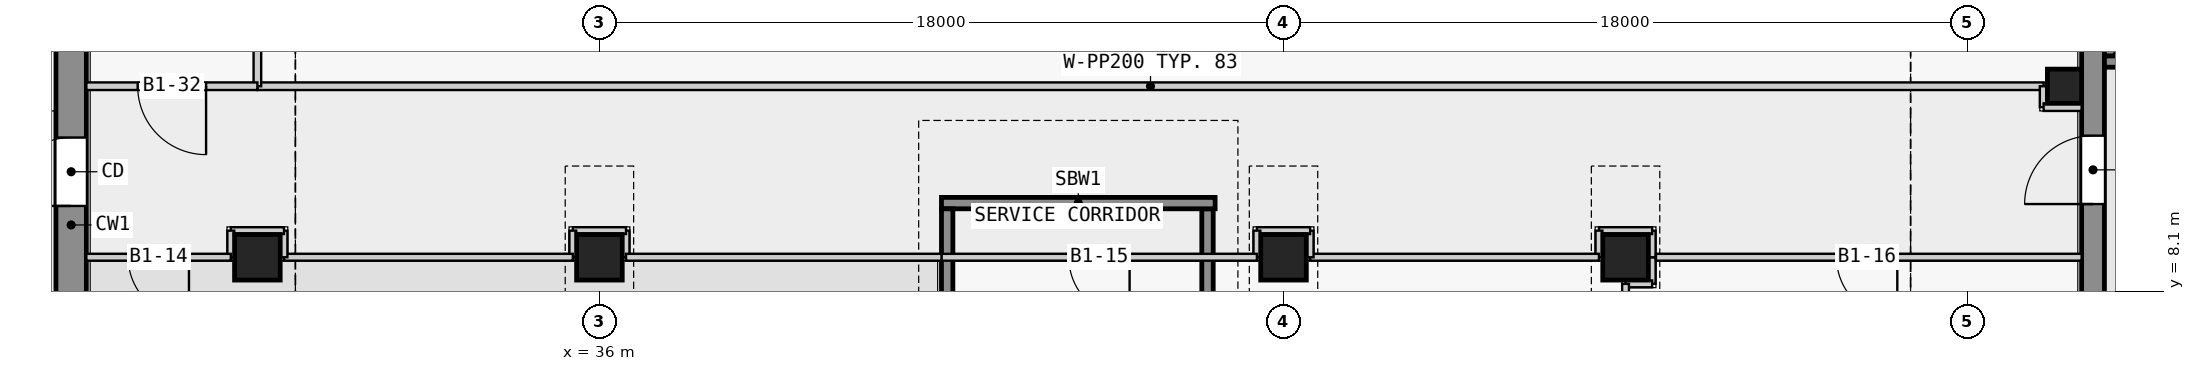
"""IFC4 building model, lengths in metres.
Left out: names, types, materials, properties, quantities, classifications, styles, units other than length and angle.
Written with IfcOpenShell. Run it as: python <this file> out.ifc"""

import sys

from ifc_helpers import new_model, si_unit, direction, frame, frame_2d, origin, origin_2d, place, context, subcontext, project, spatial, rectangle, extrude, element, fill, save


model = new_model("IFC4")
c1 = context("Model", 3, precision=1e-05, world=origin(), true_north=direction((0.0, 1.0)))
c2 = subcontext(c1, "Body", "Model", "MODEL_VIEW")
j1 = project(units=[si_unit("LENGTHUNIT", "METRE"), si_unit("PLANEANGLEUNIT", "RADIAN")], contexts=[c1])
p1 = place(None, origin())
s1 = spatial("IfcSite", under=j1, at=p1, CompositionType="ELEMENT")
p2 = place(p1, origin())
s2 = spatial("IfcBuilding", under=s1, at=p2, CompositionType="ELEMENT")
p3 = place(p2, frame((0.0, 0.0, -7.0)))
s3 = spatial("IfcBuildingStorey", under=s2, at=p3, CompositionType="ELEMENT", Elevation=-7.0)
for number, where, z_axis, x_axis in (
    (1, (27.0, 9.0, 0.0), (0.0, 0.0, 1.0), (1.0, 0.0, 0.0)),
    (2, (36.0, 9.0, 0.0), (0.0, 0.0, 1.0), (1.0, 0.0, 0.0)),
    (3, (54.0, 9.0, 0.0), (0.0, 0.0, 1.0), (1.0, 0.0, 0.0)),
    (4, (63.0, 9.0, 0.0), (0.0, 0.0, 1.0), (1.0, 0.0, 0.0)),
):
    element("IfcColumn", number, at=place(p3, frame(where, z_axis=z_axis, x_axis=x_axis)), inside=s3, PredefinedType="COLUMN", context=c2, shape_type="SweptSolid", body=[
        extrude(rectangle(XDim=1.2, YDim=1.2, at=origin_2d()), origin(), (0.0, 0.0, 1.0), 7.0),
    ])
p4 = place(p3, frame((74.55, 13.5, 0.0), z_axis=(0.0, 0.0, 1.0), x_axis=(1.0, 0.0, 0.0)))
e5 = element("IfcColumn", 5, at=p4, inside=s3, PredefinedType="COLUMN", context=c2, shape_type="SweptSolid", body=[
    extrude(rectangle(XDim=0.9, YDim=0.9, at=origin_2d()), origin(), (0.0, 0.0, 1.0), 7.0),
])
p5 = place(p3, frame((22.1, 2.5, 0.0), z_axis=(0.0, 0.0, 1.0), x_axis=(0.0, 1.0, 0.0)))
e6 = element("IfcWall", 6, at=p5, inside=s3, PredefinedType="SHEAR", context=c2, shape_type="SweptSolid", body=[
    extrude(rectangle(XDim=14.7, YDim=0.8, at=frame_2d((7.35, 0.0))), origin(), (0.0, 0.0, 1.0), 6.55),
])
p6 = place(p5, frame((7.85, 0.0, 0.0)))
e7 = element("IfcOpeningElement", 7, at=p6, cuts=e6, PredefinedType="OPENING", context=c2, shape_type="SweptSolid", body=[
    extrude(rectangle(XDim=1.8, YDim=2.1, at=frame_2d((0.9, 1.05))), frame((0.0, 0.41, 0.0), z_axis=(0.0, -1.0, 0.0), x_axis=(1.0, 0.0, 0.0)), (0.0, 0.0, 1.0), 0.82),
])
p7 = place(p3, frame((75.3, 0.6, 0.0), z_axis=(0.0, 0.0, 1.0), x_axis=(0.0, 1.0, 0.0)))
e8 = element("IfcWall", 8, at=p7, inside=s3, PredefinedType="SHEAR", context=c2, shape_type="SweptSolid", body=[
    extrude(rectangle(XDim=16.8, YDim=0.6, at=frame_2d((8.4, 0.0))), origin(), (0.0, 0.0, 1.0), 6.55),
])
p8 = place(p7, frame((9.8, 0.0, 0.0)))
e9 = element("IfcOpeningElement", 9, at=p8, cuts=e8, PredefinedType="OPENING", context=c2, shape_type="SweptSolid", body=[
    extrude(rectangle(XDim=1.8, YDim=2.1, at=frame_2d((0.9, 1.05))), frame((0.0, 0.31, 0.0), z_axis=(0.0, -1.0, 0.0), x_axis=(1.0, 0.0, 0.0)), (0.0, 0.0, 1.0), 0.62),
])
p9 = place(p3, frame((75.6, 14.15, 0.0), z_axis=(0.0, 0.0, 1.0), x_axis=(1.0, 0.0, 0.0)))
e10 = element("IfcWall", 10, at=p9, inside=s3, PredefinedType="SHEAR", context=c2, shape_type="SweptSolid", body=[
    extrude(rectangle(XDim=9.9, YDim=0.3, at=frame_2d((4.95, 0.0))), origin(), (0.0, 0.0, 1.0), 6.55),
])
p10 = place(p9, frame((5.75, 0.0, 0.0)))
e11 = element("IfcOpeningElement", 11, at=p10, cuts=e10, PredefinedType="OPENING", context=c2, shape_type="SweptSolid", body=[
    extrude(rectangle(XDim=1.1, YDim=2.1, at=frame_2d((0.55, 1.05))), frame((0.0, 0.16, 0.0), z_axis=(0.0, -1.0, 0.0), x_axis=(1.0, 0.0, 0.0)), (0.0, 0.0, 1.0), 0.32),
])
p11 = place(p9, frame((8.05, 0.0, 0.0)))
e12 = element("IfcOpeningElement", 12, at=p11, cuts=e10, PredefinedType="OPENING", context=c2, shape_type="SweptSolid", body=[
    extrude(rectangle(XDim=1.1, YDim=2.1, at=frame_2d((0.55, 1.05))), frame((0.0, 0.16, 0.0), z_axis=(0.0, -1.0, 0.0), x_axis=(1.0, 0.0, 0.0)), (0.0, 0.0, 1.0), 0.32),
])
p12 = place(p3, frame((75.75, 14.3, 0.0), z_axis=(0.0, 0.0, 1.0), x_axis=(0.0, 1.0, 0.0)))
e13 = element("IfcWall", 13, at=p12, inside=s3, PredefinedType="SHEAR", context=c2, shape_type="SweptSolid", body=[
    extrude(rectangle(XDim=2.8, YDim=0.3, at=frame_2d((1.4, 0.0))), origin(), (0.0, 0.0, 1.0), 6.55),
])
for number, where, z_axis, x_axis in (
    (14, (45.15, 7.725, 0.0), (0.0, 0.0, 1.0), (0.0, 1.0, 0.0)),
    (15, (52.0, 7.725, 0.0), (0.0, 0.0, 1.0), (0.0, 1.0, 0.0)),
):
    element("IfcWall", number, at=place(p3, frame(where, z_axis=z_axis, x_axis=x_axis)), inside=s3, PredefinedType="SHEAR", context=c2, shape_type="SweptSolid", body=[
        extrude(rectangle(XDim=2.55, YDim=0.3, at=frame_2d((1.275, 0.0))), origin(), (0.0, 0.0, 1.0), 6.55),
    ])
p13 = place(p3, frame((45.0, 10.425, 0.0), z_axis=(0.0, 0.0, 1.0), x_axis=(1.0, 0.0, 0.0)))
e16 = element("IfcWall", 16, at=p13, inside=s3, PredefinedType="SHEAR", context=c2, shape_type="SweptSolid", body=[
    extrude(rectangle(XDim=7.2, YDim=0.3, at=frame_2d((3.6, 0.0))), origin(), (0.0, 0.0, 1.0), 6.55),
])
p14 = place(p3, frame((27.0, 13.5, 0.0), z_axis=(0.0, 0.0, 1.0), x_axis=(1.0, 0.0, 0.0)))
e17 = element("IfcWall", 17, at=p14, inside=s3, PredefinedType="PARTITIONING", context=c2, shape_type="SweptSolid", body=[
    extrude(rectangle(XDim=47.0, YDim=0.2, at=frame_2d((23.5, 0.0))), origin(), (0.0, 0.0, 1.0), 6.55),
])
p15 = place(p3, frame((74.0, 13.5, 0.0), z_axis=(0.0, 0.0, 1.0), x_axis=(0.0, -1.0, 0.0)))
e18 = element("IfcWall", 18, at=p15, inside=s3, PredefinedType="PARTITIONING", context=c2, shape_type="SweptSolid", body=[
    extrude(rectangle(XDim=0.55, YDim=0.2, at=frame_2d((0.275, 0.0))), origin(), (0.0, 0.0, 1.0), 6.55),
])
p16 = place(p3, frame((74.0, 12.95, 0.0), z_axis=(0.0, 0.0, 1.0), x_axis=(1.0, 0.0, 0.0)))
e19 = element("IfcWall", 19, at=p16, inside=s3, PredefinedType="PARTITIONING", context=c2, shape_type="SweptSolid", body=[
    extrude(rectangle(XDim=1.0, YDim=0.2, at=frame_2d((0.5, 0.0))), origin(), (0.0, 0.0, 1.0), 6.55),
])
for number, where, z_axis, x_axis in (
    (20, (63.7, 9.0, 0.0), (0.0, 0.0, 1.0), (0.0, -1.0, 0.0)),
    (21, (63.7, 8.3, 0.0), (0.0, 0.0, 1.0), (-1.0, 0.0, 0.0)),
):
    element("IfcWall", number, at=place(p3, frame(where, z_axis=z_axis, x_axis=x_axis)), inside=s3, PredefinedType="PARTITIONING", context=c2, shape_type="SweptSolid", body=[
        extrude(rectangle(XDim=0.7, YDim=0.18, at=frame_2d((0.35, 0.0))), origin(), (0.0, 0.0, 1.0), 6.55),
    ])
p17 = place(p3, frame((63.0, 8.3, 0.0), z_axis=(0.0, 0.0, 1.0), x_axis=(0.0, -1.0, 0.0)))
e22 = element("IfcWall", 22, at=p17, inside=s3, PredefinedType="PARTITIONING", context=c2, shape_type="SweptSolid", body=[
    extrude(rectangle(XDim=7.6, YDim=0.18, at=frame_2d((3.8, 0.0))), origin(), (0.0, 0.0, 1.0), 6.55),
])
p18 = place(p3, frame((63.7, 9.0, 0.0), z_axis=(0.0, 0.0, 1.0), x_axis=(0.0, 1.0, 0.0)))
e23 = element("IfcWall", 23, at=p18, inside=s3, PredefinedType="PARTITIONING", context=c2, shape_type="SweptSolid", body=[
    extrude(rectangle(XDim=0.7, YDim=0.18, at=frame_2d((0.35, 0.0))), origin(), (0.0, 0.0, 1.0), 6.55),
])
p19 = place(p3, frame((63.7, 9.7, 0.0), z_axis=(0.0, 0.0, 1.0), x_axis=(-1.0, 0.0, 0.0)))
e24 = element("IfcWall", 24, at=p19, inside=s3, PredefinedType="PARTITIONING", context=c2, shape_type="SweptSolid", body=[
    extrude(rectangle(XDim=1.4, YDim=0.18, at=frame_2d((0.7, 0.0))), origin(), (0.0, 0.0, 1.0), 6.55),
])
p20 = place(p3, frame((62.3, 9.7, 0.0), z_axis=(0.0, 0.0, 1.0), x_axis=(0.0, -1.0, 0.0)))
e25 = element("IfcWall", 25, at=p20, inside=s3, PredefinedType="PARTITIONING", context=c2, shape_type="SweptSolid", body=[
    extrude(rectangle(XDim=0.7, YDim=0.18, at=frame_2d((0.35, 0.0))), origin(), (0.0, 0.0, 1.0), 6.55),
])
p21 = place(p3, frame((62.3, 9.0, 0.0), z_axis=(0.0, 0.0, 1.0), x_axis=(-1.0, 0.0, 0.0)))
e26 = element("IfcWall", 26, at=p21, inside=s3, PredefinedType="PARTITIONING", context=c2, shape_type="SweptSolid", body=[
    extrude(rectangle(XDim=7.6, YDim=0.18, at=frame_2d((3.8, 0.0))), origin(), (0.0, 0.0, 1.0), 6.55),
])
p22 = place(p3, frame((54.7, 9.0, 0.0), z_axis=(0.0, 0.0, 1.0), x_axis=(0.0, 1.0, 0.0)))
e27 = element("IfcWall", 27, at=p22, inside=s3, PredefinedType="PARTITIONING", context=c2, shape_type="SweptSolid", body=[
    extrude(rectangle(XDim=0.7, YDim=0.18, at=frame_2d((0.35, 0.0))), origin(), (0.0, 0.0, 1.0), 6.55),
])
p23 = place(p3, frame((54.7, 9.7, 0.0), z_axis=(0.0, 0.0, 1.0), x_axis=(-1.0, 0.0, 0.0)))
e28 = element("IfcWall", 28, at=p23, inside=s3, PredefinedType="PARTITIONING", context=c2, shape_type="SweptSolid", body=[
    extrude(rectangle(XDim=1.4, YDim=0.18, at=frame_2d((0.7, 0.0))), origin(), (0.0, 0.0, 1.0), 6.55),
])
p24 = place(p3, frame((53.3, 9.7, 0.0), z_axis=(0.0, 0.0, 1.0), x_axis=(0.0, -1.0, 0.0)))
e29 = element("IfcWall", 29, at=p24, inside=s3, PredefinedType="PARTITIONING", context=c2, shape_type="SweptSolid", body=[
    extrude(rectangle(XDim=0.7, YDim=0.18, at=frame_2d((0.35, 0.0))), origin(), (0.0, 0.0, 1.0), 6.55),
])
p25 = place(p3, frame((53.3, 9.0, 0.0), z_axis=(0.0, 0.0, 1.0), x_axis=(-1.0, 0.0, 0.0)))
e30 = element("IfcWall", 30, at=p25, inside=s3, PredefinedType="PARTITIONING", context=c2, shape_type="SweptSolid", body=[
    extrude(rectangle(XDim=8.3, YDim=0.18, at=frame_2d((4.15, 0.0))), origin(), (0.0, 0.0, 1.0), 6.55),
])
p26 = place(p25, frame((3.35, 0.0, 0.0)))
e31 = element("IfcOpeningElement", 31, at=p26, cuts=e30, PredefinedType="OPENING", context=c2, shape_type="SweptSolid", body=[
    extrude(rectangle(XDim=1.6, YDim=2.4, at=frame_2d((0.8, 1.2))), frame((0.0, 0.1, 0.0), z_axis=(0.0, -1.0, 0.0), x_axis=(1.0, 0.0, 0.0)), (0.0, 0.0, 1.0), 0.2),
])
p27 = place(p3, frame((36.7, 9.0, 0.0), z_axis=(0.0, 0.0, 1.0), x_axis=(0.0, 1.0, 0.0)))
e32 = element("IfcWall", 32, at=p27, inside=s3, PredefinedType="PARTITIONING", context=c2, shape_type="SweptSolid", body=[
    extrude(rectangle(XDim=0.7, YDim=0.18, at=frame_2d((0.35, 0.0))), origin(), (0.0, 0.0, 1.0), 6.55),
])
p28 = place(p3, frame((36.7, 9.7, 0.0), z_axis=(0.0, 0.0, 1.0), x_axis=(-1.0, 0.0, 0.0)))
e33 = element("IfcWall", 33, at=p28, inside=s3, PredefinedType="PARTITIONING", context=c2, shape_type="SweptSolid", body=[
    extrude(rectangle(XDim=1.4, YDim=0.18, at=frame_2d((0.7, 0.0))), origin(), (0.0, 0.0, 1.0), 6.55),
])
p29 = place(p3, frame((35.3, 9.7, 0.0), z_axis=(0.0, 0.0, 1.0), x_axis=(0.0, -1.0, 0.0)))
e34 = element("IfcWall", 34, at=p29, inside=s3, PredefinedType="PARTITIONING", context=c2, shape_type="SweptSolid", body=[
    extrude(rectangle(XDim=0.7, YDim=0.18, at=frame_2d((0.35, 0.0))), origin(), (0.0, 0.0, 1.0), 6.55),
])
p30 = place(p3, frame((35.3, 9.0, 0.0), z_axis=(0.0, 0.0, 1.0), x_axis=(-1.0, 0.0, 0.0)))
e35 = element("IfcWall", 35, at=p30, inside=s3, PredefinedType="PARTITIONING", context=c2, shape_type="SweptSolid", body=[
    extrude(rectangle(XDim=7.6, YDim=0.18, at=frame_2d((3.8, 0.0))), origin(), (0.0, 0.0, 1.0), 6.55),
])
p31 = place(p3, frame((27.7, 9.0, 0.0), z_axis=(0.0, 0.0, 1.0), x_axis=(0.0, 1.0, 0.0)))
e36 = element("IfcWall", 36, at=p31, inside=s3, PredefinedType="PARTITIONING", context=c2, shape_type="SweptSolid", body=[
    extrude(rectangle(XDim=0.7, YDim=0.18, at=frame_2d((0.35, 0.0))), origin(), (0.0, 0.0, 1.0), 6.55),
])
p32 = place(p3, frame((27.7, 9.7, 0.0), z_axis=(0.0, 0.0, 1.0), x_axis=(-1.0, 0.0, 0.0)))
e37 = element("IfcWall", 37, at=p32, inside=s3, PredefinedType="PARTITIONING", context=c2, shape_type="SweptSolid", body=[
    extrude(rectangle(XDim=1.4, YDim=0.18, at=frame_2d((0.7, 0.0))), origin(), (0.0, 0.0, 1.0), 6.55),
])
p33 = place(p3, frame((26.3, 9.7, 0.0), z_axis=(0.0, 0.0, 1.0), x_axis=(0.0, -1.0, 0.0)))
e38 = element("IfcWall", 38, at=p33, inside=s3, PredefinedType="PARTITIONING", context=c2, shape_type="SweptSolid", body=[
    extrude(rectangle(XDim=0.7, YDim=0.18, at=frame_2d((0.35, 0.0))), origin(), (0.0, 0.0, 1.0), 6.55),
])
p34 = place(p3, frame((26.3, 9.0, 0.0), z_axis=(0.0, 0.0, 1.0), x_axis=(-1.0, 0.0, 0.0)))
e39 = element("IfcWall", 39, at=p34, inside=s3, PredefinedType="PARTITIONING", context=c2, shape_type="SweptSolid", body=[
    extrude(rectangle(XDim=3.8, YDim=0.18, at=frame_2d((1.9, 0.0))), origin(), (0.0, 0.0, 1.0), 6.55),
])
p35 = place(p34, frame((1.1, 0.0, 0.0)))
e40 = element("IfcOpeningElement", 40, at=p35, cuts=e39, PredefinedType="OPENING", context=c2, shape_type="SweptSolid", body=[
    extrude(rectangle(XDim=1.6, YDim=2.4, at=frame_2d((0.8, 1.2))), frame((0.0, 0.1, 0.0), z_axis=(0.0, -1.0, 0.0), x_axis=(1.0, 0.0, 0.0)), (0.0, 0.0, 1.0), 0.2),
])
p36 = place(p3, frame((75.0, 9.0, 0.0), z_axis=(0.0, 0.0, 1.0), x_axis=(-1.0, 0.0, 0.0)))
e41 = element("IfcWall", 41, at=p36, inside=s3, PredefinedType="PARTITIONING", context=c2, shape_type="SweptSolid", body=[
    extrude(rectangle(XDim=11.2, YDim=0.18, at=frame_2d((5.6, 0.0))), origin(), (0.0, 0.0, 1.0), 6.55),
])
p37 = place(p36, frame((4.85, 0.0, 0.0)))
e42 = element("IfcOpeningElement", 42, at=p37, cuts=e41, PredefinedType="OPENING", context=c2, shape_type="SweptSolid", body=[
    extrude(rectangle(XDim=1.6, YDim=2.4, at=frame_2d((0.8, 1.2))), frame((0.0, 0.1, 0.0), z_axis=(0.0, -1.0, 0.0), x_axis=(1.0, 0.0, 0.0)), (0.0, 0.0, 1.0), 0.2),
])
p38 = place(p3, frame((27.0, 17.3, 0.0), z_axis=(0.0, 0.0, 1.0), x_axis=(0.0, -1.0, 0.0)))
e43 = element("IfcWall", 43, at=p38, inside=s3, PredefinedType="PARTITIONING", context=c2, shape_type="SweptSolid", body=[
    extrude(rectangle(XDim=3.8, YDim=0.2, at=frame_2d((1.9, 0.0))), origin(), (0.0, 0.0, 1.0), 6.55),
])
p39 = place(p3, frame((45.0, 9.0, 0.0), z_axis=(0.0, 0.0, 1.0), x_axis=(-1.0, 0.0, 0.0)))
e44 = element("IfcWall", 44, at=p39, inside=s3, PredefinedType="PARTITIONING", context=c2, shape_type="SweptSolid", body=[
    extrude(rectangle(XDim=8.3, YDim=0.18, at=frame_2d((4.15, 0.0))), origin(), (0.0, 0.0, 1.0), 6.55),
])
p40 = place(p3, frame((27.0, 13.5, 0.0), z_axis=(0.0, 0.0, 1.0), x_axis=(-1.0, 0.0, 0.0)))
e45 = element("IfcWall", 45, at=p40, inside=s3, PredefinedType="PARTITIONING", context=c2, shape_type="SweptSolid", body=[
    extrude(rectangle(XDim=4.5, YDim=0.2, at=frame_2d((2.25, 0.0))), origin(), (0.0, 0.0, 1.0), 6.55),
])
p41 = place(p40, frame((1.35, 0.0, 0.0)))
e46 = element("IfcOpeningElement", 46, at=p41, cuts=e45, PredefinedType="OPENING", context=c2, shape_type="SweptSolid", body=[
    extrude(rectangle(XDim=1.8, YDim=2.1, at=frame_2d((0.9, 1.05))), frame((0.0, 0.11, 0.0), z_axis=(0.0, -1.0, 0.0), x_axis=(1.0, 0.0, 0.0)), (0.0, 0.0, 1.0), 0.22),
])
p42 = place(p6, origin())
e47 = element("IfcDoor", 47, at=p42, inside=s3, OperationType="DOUBLE_DOOR_SINGLE_SWING", PredefinedType="DOOR", context=c2, shape_type="SweptSolid", body=[
    extrude(rectangle(XDim=1.8, YDim=2.1, at=frame_2d((0.9, 1.05))), frame((0.0, 0.025, 0.0), z_axis=(0.0, -1.0, 0.0), x_axis=(1.0, 0.0, 0.0)), (0.0, 0.0, 1.0), 0.05),
])
fill(e7, e47)
p43 = place(p8, origin())
e48 = element("IfcDoor", 48, at=p43, inside=s3, OperationType="DOUBLE_DOOR_SINGLE_SWING", PredefinedType="DOOR", context=c2, shape_type="SweptSolid", body=[
    extrude(rectangle(XDim=1.8, YDim=2.1, at=frame_2d((0.9, 1.05))), frame((0.0, 0.025, 0.0), z_axis=(0.0, -1.0, 0.0), x_axis=(1.0, 0.0, 0.0)), (0.0, 0.0, 1.0), 0.05),
])
fill(e9, e48)
p44 = place(p35, origin())
e49 = element("IfcDoor", 49, at=p44, inside=s3, OperationType="SINGLE_SWING_LEFT", PredefinedType="DOOR", context=c2, shape_type="SweptSolid", body=[
    extrude(rectangle(XDim=1.6, YDim=2.4, at=frame_2d((0.8, 1.2))), frame((0.0, 0.025, 0.0), z_axis=(0.0, -1.0, 0.0), x_axis=(1.0, 0.0, 0.0)), (0.0, 0.0, 1.0), 0.05),
])
fill(e40, e49)
p45 = place(p26, origin())
e50 = element("IfcDoor", 50, at=p45, inside=s3, OperationType="SINGLE_SWING_LEFT", PredefinedType="DOOR", context=c2, shape_type="SweptSolid", body=[
    extrude(rectangle(XDim=1.6, YDim=2.4, at=frame_2d((0.8, 1.2))), frame((0.0, 0.025, 0.0), z_axis=(0.0, -1.0, 0.0), x_axis=(1.0, 0.0, 0.0)), (0.0, 0.0, 1.0), 0.05),
])
fill(e31, e50)
p46 = place(p37, origin())
e51 = element("IfcDoor", 51, at=p46, inside=s3, OperationType="SINGLE_SWING_LEFT", PredefinedType="DOOR", context=c2, shape_type="SweptSolid", body=[
    extrude(rectangle(XDim=1.6, YDim=2.4, at=frame_2d((0.8, 1.2))), frame((0.0, 0.025, 0.0), z_axis=(0.0, -1.0, 0.0), x_axis=(1.0, 0.0, 0.0)), (0.0, 0.0, 1.0), 0.05),
])
fill(e42, e51)
p47 = place(p41, origin())
e52 = element("IfcDoor", 52, at=p47, inside=s3, OperationType="DOUBLE_DOOR_SINGLE_SWING", PredefinedType="DOOR", context=c2, shape_type="SweptSolid", body=[
    extrude(rectangle(XDim=1.8, YDim=2.1, at=frame_2d((0.9, 1.05))), frame((0.0, 0.025, 0.0), z_axis=(0.0, -1.0, 0.0), x_axis=(1.0, 0.0, 0.0)), (0.0, 0.0, 1.0), 0.05),
])
fill(e46, e52)
save(model, sys.argv[1])
